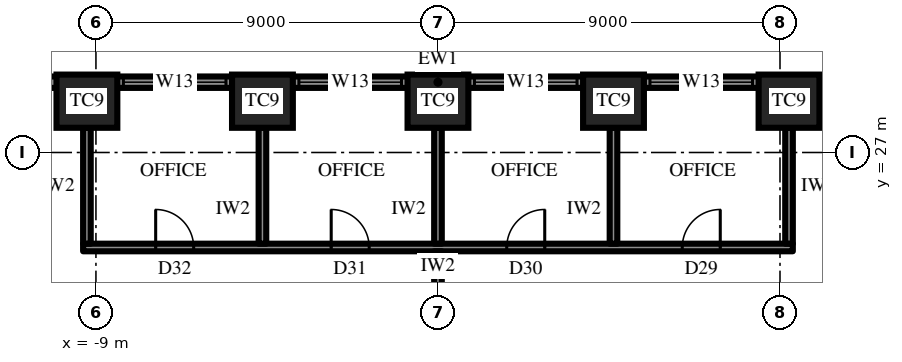
"""IFC4 building model, lengths in metres.
Left out: names, types, materials, properties, quantities, classifications, styles, units other than length and angle.
Written with IfcOpenShell. Run it as: python <this file> out.ifc"""

import sys

from ifc_helpers import new_model, si_unit, direction, frame, frame_2d, origin, origin_2d, place, context, subcontext, project, spatial, rectangle, extrude, element, fill, save


model = new_model("IFC4")
c1 = context("Model", 3, precision=1e-05, world=origin(), true_north=direction((0.0, 1.0)))
c2 = subcontext(c1, "Body", "Model", "MODEL_VIEW")
j1 = project(units=[si_unit("LENGTHUNIT", "METRE"), si_unit("PLANEANGLEUNIT", "RADIAN")], contexts=[c1])
p1 = place(None, origin())
s1 = spatial("IfcSite", under=j1, at=p1, CompositionType="ELEMENT")
p2 = place(p1, origin())
s2 = spatial("IfcBuilding", under=s1, at=p2, CompositionType="ELEMENT")
p3 = place(p2, frame((0.0, 0.0, 219.7)))
s3 = spatial("IfcBuildingStorey", under=s2, at=p3, CompositionType="ELEMENT", Elevation=219.7)
for number, where, z_axis, x_axis in (
    (1, (9.238, 28.35, 0.0), (0.0, 0.0, 1.0), (-1.0, 0.0, 0.0)),
    (2, (4.619, 28.35, 0.0), (0.0, 0.0, 1.0), (-1.0, 0.0, 0.0)),
    (3, (0.0, 28.35, 0.0), (0.0, 0.0, 1.0), (-1.0, 0.0, 0.0)),
    (4, (-4.619, 28.35, 0.0), (0.0, 0.0, 1.0), (-1.0, 0.0, 0.0)),
    (5, (-9.238, 28.35, 0.0), (0.0, 0.0, 1.0), (-1.0, 0.0, 0.0)),
):
    element("IfcColumn", number, at=place(p3, frame(where, z_axis=z_axis, x_axis=x_axis)), inside=s3, PredefinedType="COLUMN", context=c2, shape_type="SweptSolid", body=[
        extrude(rectangle(XDim=1.6, YDim=1.4, at=origin_2d()), origin(), (0.0, 0.0, 1.0), 4.2),
    ])
p4 = place(p3, frame((13.856, 28.85, 0.0), z_axis=(0.0, 0.0, 1.0), x_axis=(-1.0, 0.0, 0.0)))
e6 = element("IfcWall", 6, at=p4, inside=s3, PredefinedType="SOLIDWALL", context=c2, shape_type="SweptSolid", body=[
    extrude(rectangle(XDim=27.713, YDim=0.3, at=frame_2d((13.856, 0.0))), origin(), (0.0, 0.0, 1.0), 2.0),
])
p5 = place(p4, frame((0.959, 0.0, 0.6)))
e7 = element("IfcOpeningElement", 7, at=p5, cuts=e6, PredefinedType="OPENING", context=c2, shape_type="SweptSolid", body=[
    extrude(rectangle(XDim=2.7, YDim=1.15, at=frame_2d((1.35, 0.575))), frame((0.0, 0.16, 0.0), z_axis=(0.0, -1.0, 0.0), x_axis=(1.0, 0.0, 0.0)), (0.0, 0.0, 1.0), 0.32),
])
p6 = place(p4, frame((5.578, 0.0, 0.6)))
e8 = element("IfcOpeningElement", 8, at=p6, cuts=e6, PredefinedType="OPENING", context=c2, shape_type="SweptSolid", body=[
    extrude(rectangle(XDim=2.7, YDim=1.15, at=frame_2d((1.35, 0.575))), frame((0.0, 0.16, 0.0), z_axis=(0.0, -1.0, 0.0), x_axis=(1.0, 0.0, 0.0)), (0.0, 0.0, 1.0), 0.32),
])
p7 = place(p4, frame((10.197, 0.0, 0.6)))
e9 = element("IfcOpeningElement", 9, at=p7, cuts=e6, PredefinedType="OPENING", context=c2, shape_type="SweptSolid", body=[
    extrude(rectangle(XDim=2.7, YDim=1.15, at=frame_2d((1.35, 0.575))), frame((0.0, 0.16, 0.0), z_axis=(0.0, -1.0, 0.0), x_axis=(1.0, 0.0, 0.0)), (0.0, 0.0, 1.0), 0.32),
])
p8 = place(p4, frame((14.816, 0.0, 0.6)))
e10 = element("IfcOpeningElement", 10, at=p8, cuts=e6, PredefinedType="OPENING", context=c2, shape_type="SweptSolid", body=[
    extrude(rectangle(XDim=2.7, YDim=1.15, at=frame_2d((1.35, 0.575))), frame((0.0, 0.16, 0.0), z_axis=(0.0, -1.0, 0.0), x_axis=(1.0, 0.0, 0.0)), (0.0, 0.0, 1.0), 0.32),
])
p9 = place(p4, frame((19.435, 0.0, 0.6)))
e11 = element("IfcOpeningElement", 11, at=p9, cuts=e6, PredefinedType="OPENING", context=c2, shape_type="SweptSolid", body=[
    extrude(rectangle(XDim=2.7, YDim=1.15, at=frame_2d((1.35, 0.575))), frame((0.0, 0.16, 0.0), z_axis=(0.0, -1.0, 0.0), x_axis=(1.0, 0.0, 0.0)), (0.0, 0.0, 1.0), 0.32),
])
p10 = place(p4, frame((24.053, 0.0, 0.6)))
e12 = element("IfcOpeningElement", 12, at=p10, cuts=e6, PredefinedType="OPENING", context=c2, shape_type="SweptSolid", body=[
    extrude(rectangle(XDim=2.7, YDim=1.15, at=frame_2d((1.35, 0.575))), frame((0.0, 0.16, 0.0), z_axis=(0.0, -1.0, 0.0), x_axis=(1.0, 0.0, 0.0)), (0.0, 0.0, 1.0), 0.32),
])
p11 = place(p3, frame((9.338, 24.5, 0.0), z_axis=(0.0, 0.0, 1.0), x_axis=(-1.0, 0.0, 0.0)))
e13 = element("IfcWall", 13, at=p11, inside=s3, PredefinedType="PARTITIONING", context=c2, shape_type="SweptSolid", body=[
    extrude(rectangle(XDim=18.675, YDim=0.2, at=frame_2d((9.338, 0.0))), origin(), (0.0, 0.0, 1.0), 4.0),
])
p12 = place(p11, frame((1.909, 0.0, 0.0)))
e14 = element("IfcOpeningElement", 14, at=p12, cuts=e13, PredefinedType="OPENING", context=c2, shape_type="SweptSolid", body=[
    extrude(rectangle(XDim=1.0, YDim=2.2, at=frame_2d((0.5, 1.1))), frame((0.0, 0.11, 0.0), z_axis=(0.0, -1.0, 0.0), x_axis=(1.0, 0.0, 0.0)), (0.0, 0.0, 1.0), 0.22),
])
p13 = place(p11, frame((6.528, 0.0, 0.0)))
e15 = element("IfcOpeningElement", 15, at=p13, cuts=e13, PredefinedType="OPENING", context=c2, shape_type="SweptSolid", body=[
    extrude(rectangle(XDim=1.0, YDim=2.2, at=frame_2d((0.5, 1.1))), frame((0.0, 0.11, 0.0), z_axis=(0.0, -1.0, 0.0), x_axis=(1.0, 0.0, 0.0)), (0.0, 0.0, 1.0), 0.22),
])
p14 = place(p11, frame((11.147, 0.0, 0.0)))
e16 = element("IfcOpeningElement", 16, at=p14, cuts=e13, PredefinedType="OPENING", context=c2, shape_type="SweptSolid", body=[
    extrude(rectangle(XDim=1.0, YDim=2.2, at=frame_2d((0.5, 1.1))), frame((0.0, 0.11, 0.0), z_axis=(0.0, -1.0, 0.0), x_axis=(1.0, 0.0, 0.0)), (0.0, 0.0, 1.0), 0.22),
])
p15 = place(p11, frame((15.766, 0.0, 0.0)))
e17 = element("IfcOpeningElement", 17, at=p15, cuts=e13, PredefinedType="OPENING", context=c2, shape_type="SweptSolid", body=[
    extrude(rectangle(XDim=1.0, YDim=2.2, at=frame_2d((0.5, 1.1))), frame((0.0, 0.11, 0.0), z_axis=(0.0, -1.0, 0.0), x_axis=(1.0, 0.0, 0.0)), (0.0, 0.0, 1.0), 0.22),
])
for number, where, z_axis, x_axis in (
    (18, (9.238, 24.6, 0.0), (0.0, 0.0, 1.0), (0.0, 1.0, 0.0)),
    (19, (4.619, 24.6, 0.0), (0.0, 0.0, 1.0), (0.0, 1.0, 0.0)),
    (20, (0.0, 24.6, 0.0), (0.0, 0.0, 1.0), (0.0, 1.0, 0.0)),
    (21, (-4.619, 24.6, 0.0), (0.0, 0.0, 1.0), (0.0, 1.0, 0.0)),
    (22, (-9.238, 24.6, 0.0), (0.0, 0.0, 1.0), (0.0, 1.0, 0.0)),
):
    element("IfcWall", number, at=place(p3, frame(where, z_axis=z_axis, x_axis=x_axis)), inside=s3, PredefinedType="PARTITIONING", context=c2, shape_type="SweptSolid", body=[
        extrude(rectangle(XDim=3.05, YDim=0.2, at=frame_2d((1.525, 0.0))), origin(), (0.0, 0.0, 1.0), 2.992),
    ])
p16 = place(p3, frame((0.0, 19.2, 0.0), z_axis=(0.0, 0.0, 1.0), x_axis=(0.0, 1.0, 0.0)))
e23 = element("IfcWall", 23, at=p16, inside=s3, PredefinedType="PARTITIONING", context=c2, shape_type="SweptSolid", body=[
    extrude(rectangle(XDim=5.2, YDim=0.2, at=frame_2d((2.6, 0.0))), origin(), (0.0, 0.0, 1.0), 2.992),
])
p17 = place(p6, origin())
e24 = element("IfcWindow", 24, at=p17, inside=s3, PartitioningType="SINGLE_PANEL", PredefinedType="WINDOW", context=c2, shape_type="SweptSolid", body=[
    extrude(rectangle(XDim=2.7, YDim=1.15, at=frame_2d((1.35, 0.575))), frame((0.0, 0.03, 0.0), z_axis=(0.0, -1.0, 0.0), x_axis=(1.0, 0.0, 0.0)), (0.0, 0.0, 1.0), 0.06),
])
fill(e8, e24)
p18 = place(p7, origin())
e25 = element("IfcWindow", 25, at=p18, inside=s3, PartitioningType="SINGLE_PANEL", PredefinedType="WINDOW", context=c2, shape_type="SweptSolid", body=[
    extrude(rectangle(XDim=2.7, YDim=1.15, at=frame_2d((1.35, 0.575))), frame((0.0, 0.03, 0.0), z_axis=(0.0, -1.0, 0.0), x_axis=(1.0, 0.0, 0.0)), (0.0, 0.0, 1.0), 0.06),
])
fill(e9, e25)
p19 = place(p8, origin())
e26 = element("IfcWindow", 26, at=p19, inside=s3, PartitioningType="SINGLE_PANEL", PredefinedType="WINDOW", context=c2, shape_type="SweptSolid", body=[
    extrude(rectangle(XDim=2.7, YDim=1.15, at=frame_2d((1.35, 0.575))), frame((0.0, 0.03, 0.0), z_axis=(0.0, -1.0, 0.0), x_axis=(1.0, 0.0, 0.0)), (0.0, 0.0, 1.0), 0.06),
])
fill(e10, e26)
p20 = place(p9, origin())
e27 = element("IfcWindow", 27, at=p20, inside=s3, PartitioningType="SINGLE_PANEL", PredefinedType="WINDOW", context=c2, shape_type="SweptSolid", body=[
    extrude(rectangle(XDim=2.7, YDim=1.15, at=frame_2d((1.35, 0.575))), frame((0.0, 0.03, 0.0), z_axis=(0.0, -1.0, 0.0), x_axis=(1.0, 0.0, 0.0)), (0.0, 0.0, 1.0), 0.06),
])
fill(e11, e27)
p21 = place(p12, frame((1.0, 0.0, 0.0), z_axis=(0.0, 0.0, 1.0), x_axis=(-1.0, 0.0, 0.0)))
e28 = element("IfcDoor", 28, at=p21, inside=s3, OperationType="SINGLE_SWING_LEFT", PredefinedType="DOOR", context=c2, shape_type="SweptSolid", body=[
    extrude(rectangle(XDim=1.0, YDim=2.2, at=frame_2d((0.5, 1.1))), frame((0.0, 0.025, 0.0), z_axis=(0.0, -1.0, 0.0), x_axis=(1.0, 0.0, 0.0)), (0.0, 0.0, 1.0), 0.05),
])
fill(e14, e28)
p22 = place(p13, frame((1.0, 0.0, 0.0), z_axis=(0.0, 0.0, 1.0), x_axis=(-1.0, 0.0, 0.0)))
e29 = element("IfcDoor", 29, at=p22, inside=s3, OperationType="SINGLE_SWING_LEFT", PredefinedType="DOOR", context=c2, shape_type="SweptSolid", body=[
    extrude(rectangle(XDim=1.0, YDim=2.2, at=frame_2d((0.5, 1.1))), frame((0.0, 0.025, 0.0), z_axis=(0.0, -1.0, 0.0), x_axis=(1.0, 0.0, 0.0)), (0.0, 0.0, 1.0), 0.05),
])
fill(e15, e29)
p23 = place(p14, frame((1.0, 0.0, 0.0), z_axis=(0.0, 0.0, 1.0), x_axis=(-1.0, 0.0, 0.0)))
e30 = element("IfcDoor", 30, at=p23, inside=s3, OperationType="SINGLE_SWING_RIGHT", PredefinedType="DOOR", context=c2, shape_type="SweptSolid", body=[
    extrude(rectangle(XDim=1.0, YDim=2.2, at=frame_2d((0.5, 1.1))), frame((0.0, 0.025, 0.0), z_axis=(0.0, -1.0, 0.0), x_axis=(1.0, 0.0, 0.0)), (0.0, 0.0, 1.0), 0.05),
])
fill(e16, e30)
p24 = place(p15, frame((1.0, 0.0, 0.0), z_axis=(0.0, 0.0, 1.0), x_axis=(-1.0, 0.0, 0.0)))
e31 = element("IfcDoor", 31, at=p24, inside=s3, OperationType="SINGLE_SWING_RIGHT", PredefinedType="DOOR", context=c2, shape_type="SweptSolid", body=[
    extrude(rectangle(XDim=1.0, YDim=2.2, at=frame_2d((0.5, 1.1))), frame((0.0, 0.025, 0.0), z_axis=(0.0, -1.0, 0.0), x_axis=(1.0, 0.0, 0.0)), (0.0, 0.0, 1.0), 0.05),
])
fill(e17, e31)
save(model, sys.argv[1])
